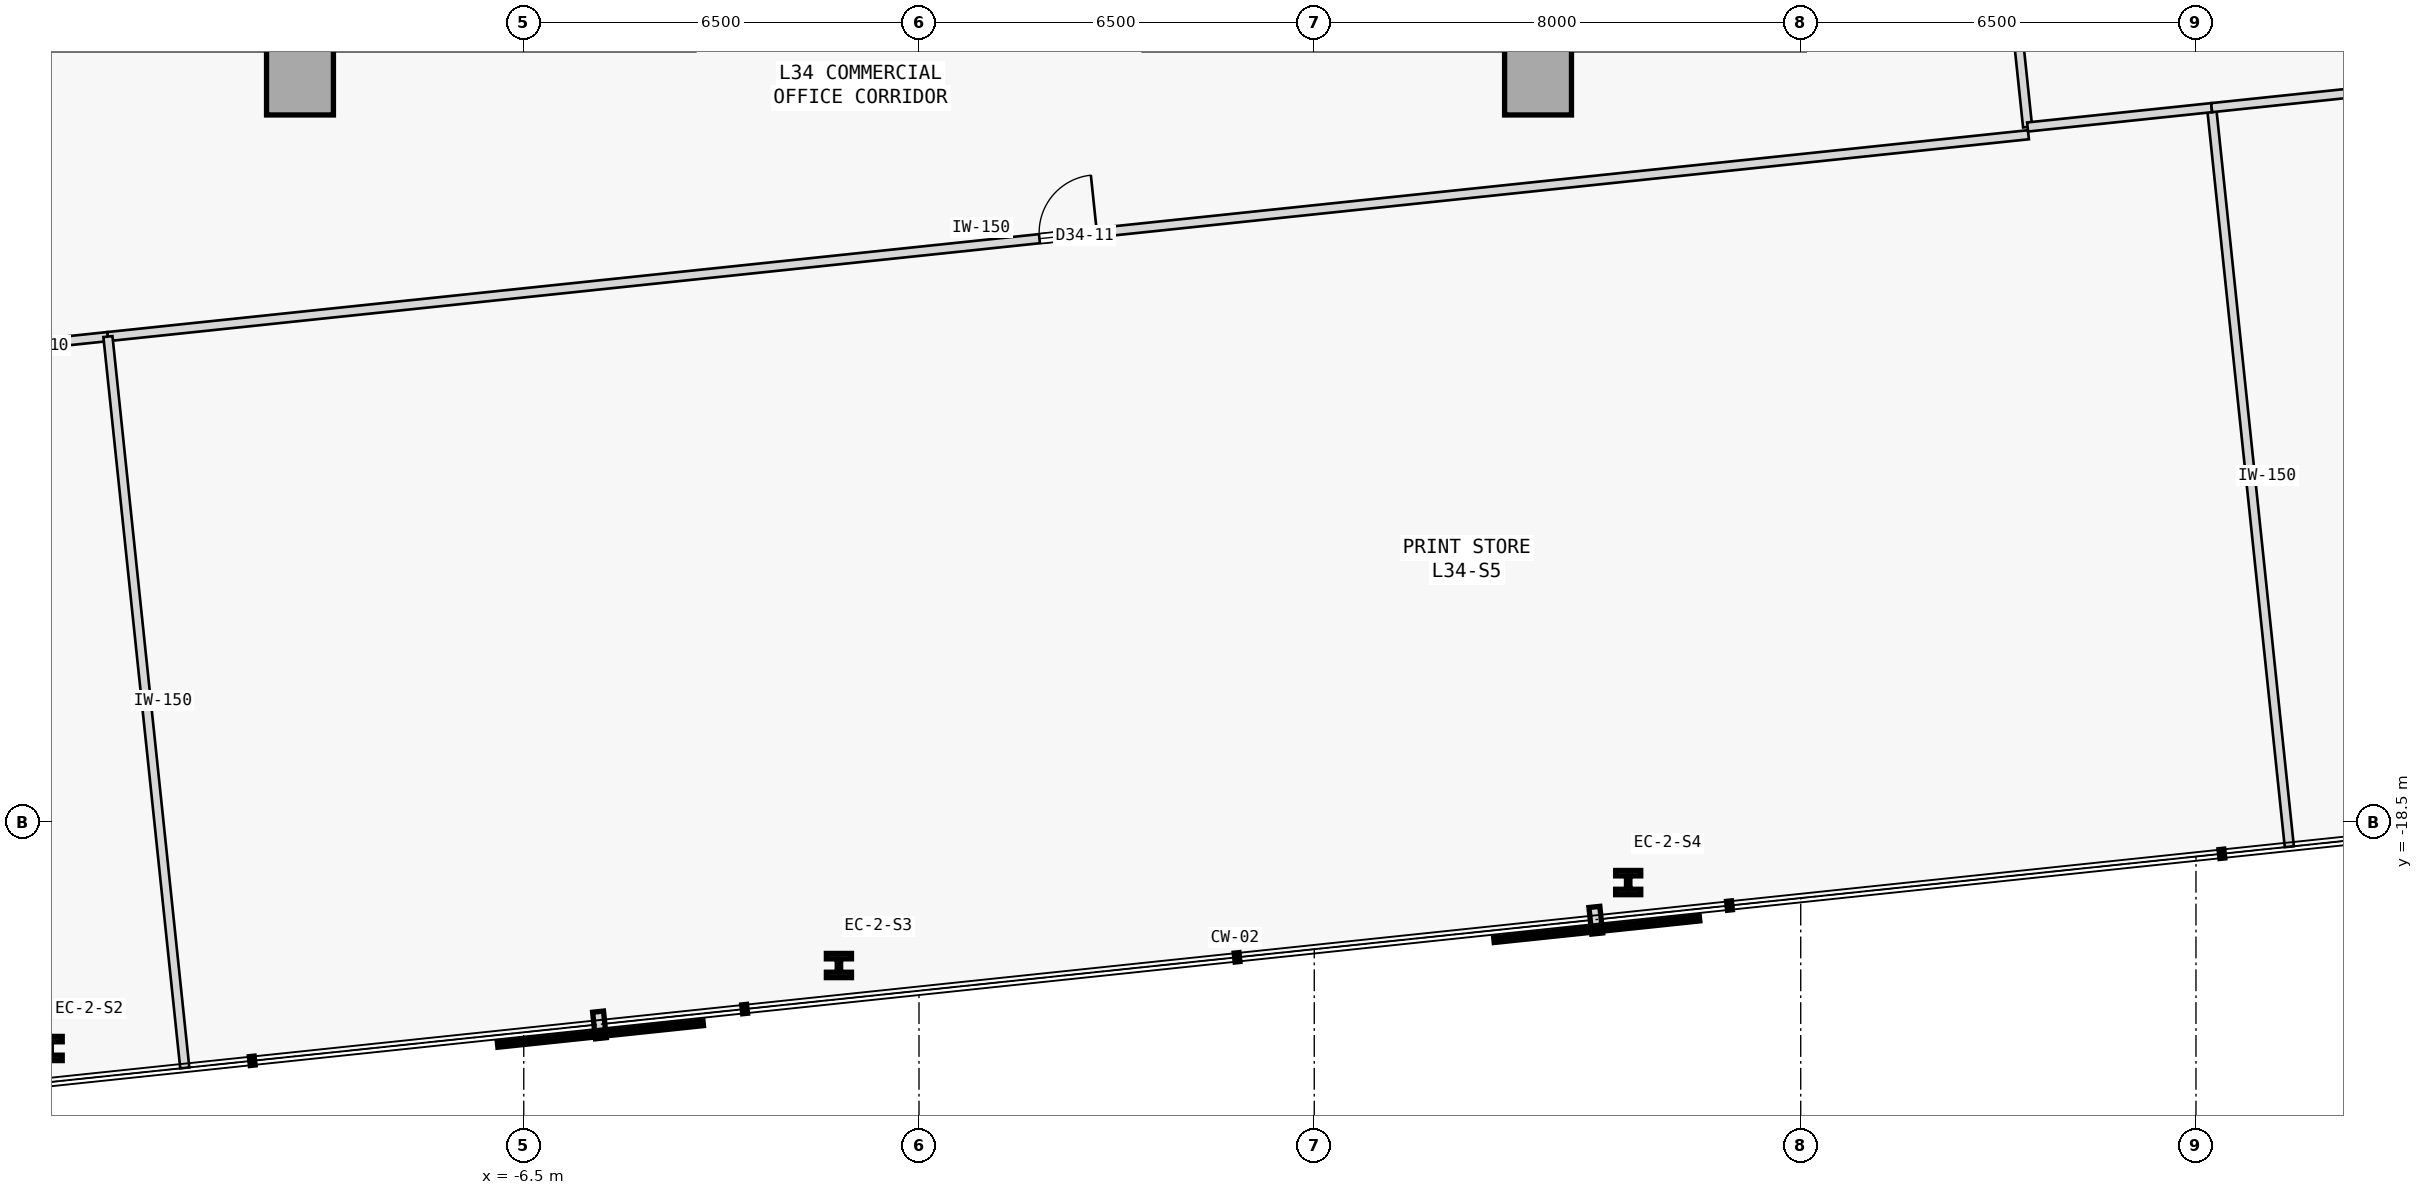
"""IFC4 building model, lengths in metres.
Left out: names, types, materials, properties, quantities, classifications, styles, units other than length and angle.
Written with IfcOpenShell. Run it as: python <this file> out.ifc"""

import sys

from ifc_helpers import new_model, si_unit, direction, frame, frame_2d, origin, origin_2d, place, context, subcontext, project, spatial, rectangle, i_section, extrude, element, fill, save


model = new_model("IFC4")
c1 = context("Model", 3, precision=1e-05, world=origin(), true_north=direction((0.0, 1.0)))
c2 = subcontext(c1, "Body", "Model", "MODEL_VIEW")
j1 = project(units=[si_unit("LENGTHUNIT", "METRE"), si_unit("PLANEANGLEUNIT", "RADIAN")], contexts=[c1])
p1 = place(None, origin())
s1 = spatial("IfcSite", under=j1, at=p1, CompositionType="ELEMENT")
p2 = place(p1, origin())
s2 = spatial("IfcBuilding", under=s1, at=p2, CompositionType="ELEMENT")
p3 = place(p2, frame((0.0, 0.0, 135.5)))
s3 = spatial("IfcBuildingStorey", under=s2, at=p3, CompositionType="ELEMENT", Elevation=135.5)
for number, where, z_axis, x_axis in (
    (1, (-10.18, -6.32, 0.0), (0.0, 0.0, 1.0), (1.0, 0.0, 0.0)),
    (2, (10.18, -6.32, 0.0), (0.0, 0.0, 1.0), (1.0, 0.0, 0.0)),
):
    element("IfcColumn", number, at=place(p3, frame(where, z_axis=z_axis, x_axis=x_axis)), inside=s3, PredefinedType="COLUMN", context=c2, shape_type="SweptSolid", body=[
        extrude(rectangle(XDim=1.1, YDim=1.1, at=origin_2d()), origin(), (0.0, 0.0, 1.0), 3.7),
    ])
for number, where, z_axis, x_axis in (
    (3, (-14.297, -22.222, 0.0), (0.0, 0.0, 1.0), (1.0, 0.0, 0.0)),
    (4, (-1.317, -20.858, 0.0), (0.0, 0.0, 1.0), (1.0, 0.0, 0.0)),
    (5, (11.663, -19.494, 0.0), (0.0, 0.0, 1.0), (1.0, 0.0, 0.0)),
):
    element("IfcColumn", number, at=place(p3, frame(where, z_axis=z_axis, x_axis=x_axis)), inside=s3, PredefinedType="COLUMN", context=c2, shape_type="SweptSolid", body=[
        extrude(i_section(OverallWidth=0.413, OverallDepth=0.398, WebThickness=0.056, FlangeThickness=0.089, FilletRadius=0.015, at=origin_2d()), origin(), (0.0, 0.0, 1.0), 3.7),
    ])
p4 = place(p3, frame((-16.14, -10.809, 0.0), z_axis=(0.0, 0.0, 1.0), x_axis=(0.994522535937, 0.104522368483, 0.0)))
e6 = element("IfcWall", 6, at=p4, inside=s3, PredefinedType="PARTITIONING", context=c2, shape_type="SweptSolid", body=[
    extrude(rectangle(XDim=2.817, YDim=0.15, at=frame_2d((1.408, 0.0))), origin(), (0.0, 0.0, 1.0), 3.475),
])
p5 = place(p4, frame((0.934, 0.0, 0.0)))
e7 = element("IfcOpeningElement", 7, at=p5, cuts=e6, PredefinedType="OPENING", context=c2, shape_type="SweptSolid", body=[
    extrude(rectangle(XDim=0.95, YDim=2.15, at=frame_2d((0.475, 1.075))), frame((0.0, 0.085, 0.0), z_axis=(0.0, -1.0, 0.0), x_axis=(1.0, 0.0, 0.0)), (0.0, 0.0, 1.0), 0.17),
])
p6 = place(p3, frame((-13.338, -10.515, 0.0), z_axis=(0.0, 0.0, 1.0), x_axis=(0.994522458216, 0.104523107989, 0.0)))
e8 = element("IfcWall", 8, at=p6, inside=s3, PredefinedType="PARTITIONING", context=c2, shape_type="SweptSolid", body=[
    extrude(rectangle(XDim=31.757, YDim=0.15, at=frame_2d((15.878, 0.0))), origin(), (0.0, 0.0, 1.0), 3.475),
])
p7 = place(p6, frame((15.404, 0.0, 0.0)))
e9 = element("IfcOpeningElement", 9, at=p7, cuts=e8, PredefinedType="OPENING", context=c2, shape_type="SweptSolid", body=[
    extrude(rectangle(XDim=0.95, YDim=2.15, at=frame_2d((0.475, 1.075))), frame((0.0, 0.085, 0.0), z_axis=(0.0, -1.0, 0.0), x_axis=(1.0, 0.0, 0.0)), (0.0, 0.0, 1.0), 0.17),
])
p8 = place(p3, frame((18.231, -7.068, 0.0), z_axis=(0.0, 0.0, 1.0), x_axis=(-0.104536082083, 0.994521094569, 0.0)))
e10 = element("IfcWall", 10, at=p8, inside=s3, PredefinedType="PARTITIONING", context=c2, shape_type="SweptSolid", body=[
    extrude(rectangle(XDim=11.794, YDim=0.15, at=frame_2d((5.897, 0.0))), origin(), (0.0, 0.0, 1.0), 3.475),
])
p9 = place(p8, frame((5.422, 0.0, 0.0)))
e11 = element("IfcOpeningElement", 11, at=p9, cuts=e10, PredefinedType="OPENING", context=c2, shape_type="SweptSolid", body=[
    extrude(rectangle(XDim=0.95, YDim=2.15, at=frame_2d((0.475, 1.075))), frame((0.0, 0.085, 0.0), z_axis=(0.0, -1.0, 0.0), x_axis=(1.0, 0.0, 0.0)), (0.0, 0.0, 1.0), 0.17),
])
p10 = place(p3, frame((-12.074, -22.542, 0.0), z_axis=(0.0, 0.0, 1.0), x_axis=(-0.104515587229, 0.99452324861, 0.0)))
e12 = element("IfcWall", 12, at=p10, inside=s3, PredefinedType="PARTITIONING", context=c2, shape_type="SweptSolid", body=[
    extrude(rectangle(XDim=12.093, YDim=0.15, at=frame_2d((6.046, 0.0))), origin(), (0.0, 0.0, 1.0), 3.475),
])
p11 = place(p3, frame((22.535, -18.904, 0.0), z_axis=(0.0, 0.0, 1.0), x_axis=(-0.104520477826, 0.99452273464, 0.0)))
e13 = element("IfcWall", 13, at=p11, inside=s3, PredefinedType="PARTITIONING", context=c2, shape_type="SweptSolid", body=[
    extrude(rectangle(XDim=12.221, YDim=0.15, at=frame_2d((6.11, 0.0))), origin(), (0.0, 0.0, 1.0), 3.475),
])
p12 = place(p3, frame((18.231, -7.068, 0.0), z_axis=(0.0, 0.0, 1.0), x_axis=(0.994520828596, 0.104538612428, 0.0)))
e14 = element("IfcWall", 14, at=p12, inside=s3, PredefinedType="PARTITIONING", context=c2, shape_type="SweptSolid", body=[
    extrude(rectangle(XDim=3.043, YDim=0.15, at=frame_2d((1.521, 0.0))), origin(), (0.0, 0.0, 1.0), 3.475),
])
p13 = place(p3, frame((21.258, -6.75, 0.0), z_axis=(0.0, 0.0, 1.0), x_axis=(0.994521409189, 0.104533088851, 0.0)))
e15 = element("IfcWall", 15, at=p13, inside=s3, PredefinedType="PARTITIONING", context=c2, shape_type="SweptSolid", body=[
    extrude(rectangle(XDim=18.85, YDim=0.15, at=frame_2d((9.425, 0.0))), origin(), (0.0, 0.0, 1.0), 3.475),
])
p14 = place(p13, frame((8.95, 0.0, 0.0)))
e16 = element("IfcOpeningElement", 16, at=p14, cuts=e15, PredefinedType="OPENING", context=c2, shape_type="SweptSolid", body=[
    extrude(rectangle(XDim=0.95, YDim=2.15, at=frame_2d((0.475, 1.075))), frame((0.0, 0.085, 0.0), z_axis=(0.0, -1.0, 0.0), x_axis=(1.0, 0.0, 0.0)), (0.0, 0.0, 1.0), 0.17),
])
p15 = place(p7, origin())
e17 = element("IfcDoor", 17, at=p15, inside=s3, OperationType="SINGLE_SWING_RIGHT", PredefinedType="DOOR", context=c2, shape_type="SweptSolid", body=[
    extrude(rectangle(XDim=0.95, YDim=2.15, at=frame_2d((0.475, 1.075))), frame((0.0, 0.025, 0.0), z_axis=(0.0, -1.0, 0.0), x_axis=(1.0, 0.0, 0.0)), (0.0, 0.0, 1.0), 0.05),
])
fill(e9, e17)
save(model, sys.argv[1])
